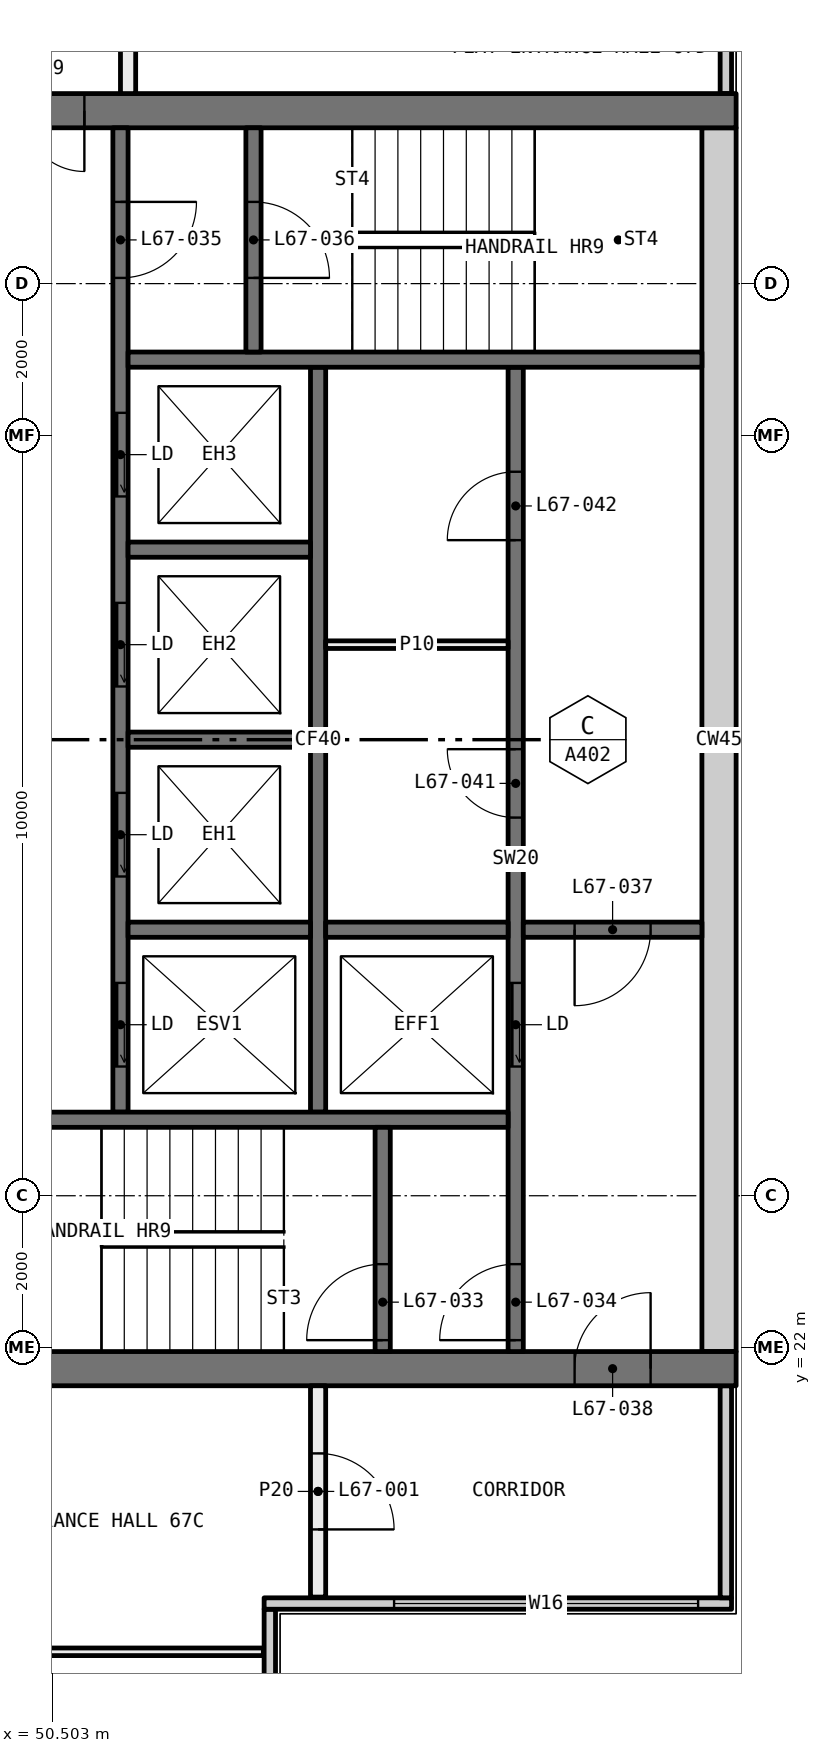
"""IFC4 building model, lengths in metres.
Left out: names, types, materials, properties, quantities, classifications, styles, units other than length and angle.
Written with IfcOpenShell. Run it as: python <this file> out.ifc"""

import sys

from ifc_helpers import new_model, si_unit, direction, frame, frame_2d, origin, place, context, subcontext, project, spatial, rectangle, extrude, element, fill, save


model = new_model("IFC4")
c1 = context("Model", 3, precision=1e-05, world=origin(), true_north=direction((0.0, 1.0)))
c2 = subcontext(c1, "Body", "Model", "MODEL_VIEW")
j1 = project(units=[si_unit("LENGTHUNIT", "METRE"), si_unit("PLANEANGLEUNIT", "RADIAN")], contexts=[c1])
p1 = place(None, origin())
s1 = spatial("IfcSite", under=j1, at=p1, CompositionType="ELEMENT")
p2 = place(p1, origin())
s2 = spatial("IfcBuilding", under=s1, at=p2, CompositionType="ELEMENT")
p3 = place(p2, frame((0.0, 0.0, 249.0)))
s3 = spatial("IfcBuildingStorey", under=s2, at=p3, CompositionType="ELEMENT", Elevation=249.0)
p4 = place(p3, frame((53.365, 12.71, 0.0), z_axis=(0.0, 0.0, 1.0), x_axis=(0.0, 1.0, 0.0)))
e1 = element("IfcWall", 1, at=p4, inside=s3, PredefinedType="ELEMENTEDWALL", context=c2, shape_type="SweptSolid", body=[
    extrude(rectangle(XDim=5.85, YDim=0.15, at=frame_2d((2.925, 0.0))), origin(), (0.0, 0.0, 1.0), 3.05),
])
p5 = place(p4, frame((0.29, 0.0, 0.45)))
e2 = element("IfcOpeningElement", 2, at=p5, cuts=e1, PredefinedType="OPENING", context=c2, shape_type="SweptSolid", body=[
    extrude(rectangle(XDim=4.0, YDim=2.55, at=frame_2d((2.0, 1.275))), frame((0.0, 0.085, 0.0), z_axis=(0.0, -1.0, 0.0), x_axis=(1.0, 0.0, 0.0)), (0.0, 0.0, 1.0), 0.17),
])
p6 = place(p3, frame((53.29, 18.635, 0.0), z_axis=(0.0, 0.0, 1.0), x_axis=(1.0, 0.0, 0.0)))
e3 = element("IfcWall", 3, at=p6, inside=s3, PredefinedType="ELEMENTEDWALL", context=c2, shape_type="SweptSolid", body=[
    extrude(rectangle(XDim=6.15, YDim=0.15, at=frame_2d((3.075, 0.0))), origin(), (0.0, 0.0, 1.0), 3.05),
])
p7 = place(p6, frame((1.71, 0.0, 0.45)))
e4 = element("IfcOpeningElement", 4, at=p7, cuts=e3, PredefinedType="OPENING", context=c2, shape_type="SweptSolid", body=[
    extrude(rectangle(XDim=4.0, YDim=2.55, at=frame_2d((2.0, 1.275))), frame((0.0, 0.085, 0.0), z_axis=(0.0, -1.0, 0.0), x_axis=(1.0, 0.0, 0.0)), (0.0, 0.0, 1.0), 0.17),
])
for number, where, z_axis, x_axis in (
    (5, (59.365, 18.71, 0.0), (0.0, 0.0, 1.0), (0.0, 1.0, 0.0)),
    (6, (59.365, 38.5, 0.0), (0.0, 0.0, 1.0), (0.0, 1.0, 0.0)),
):
    element("IfcWall", number, at=place(p3, frame(where, z_axis=z_axis, x_axis=x_axis)), inside=s3, PredefinedType="ELEMENTEDWALL", context=c2, shape_type="SweptSolid", body=[
        extrude(rectangle(XDim=2.79, YDim=0.15, at=frame_2d((1.395, 0.0))), origin(), (0.0, 0.0, 1.0), 3.05),
    ])
p8 = place(p3, frame((53.28, 18.0, 0.0), z_axis=(0.0, 0.0, 1.0), x_axis=(-1.0, 0.0, 0.0)))
e7 = element("IfcWall", 7, at=p8, inside=s3, PredefinedType="PARTITIONING", context=c2, shape_type="SweptSolid", body=[
    extrude(rectangle(XDim=4.78, YDim=0.1, at=frame_2d((2.39, 0.0))), origin(), (0.0, 0.0, 1.0), 3.05),
])
p9 = place(p3, frame((54.0, 18.72, 0.0), z_axis=(0.0, 0.0, 1.0), x_axis=(0.0, 1.0, 0.0)))
e8 = element("IfcWall", 8, at=p9, inside=s3, PredefinedType="PARTITIONING", context=c2, shape_type="SweptSolid", body=[
    extrude(rectangle(XDim=2.78, YDim=0.2, at=frame_2d((1.39, 0.0))), origin(), (0.0, 0.0, 1.0), 3.05),
])
p10 = place(p9, frame((0.89, 0.0, 0.0)))
e9 = element("IfcOpeningElement", 9, at=p10, cuts=e8, PredefinedType="OPENING", context=c2, shape_type="SweptSolid", body=[
    extrude(rectangle(XDim=1.0, YDim=2.1, at=frame_2d((0.5, 1.05))), frame((0.0, 0.11, 0.0), z_axis=(0.0, -1.0, 0.0), x_axis=(1.0, 0.0, 0.0)), (0.0, 0.0, 1.0), 0.22),
])
p11 = place(p3, frame((51.5, 41.9, 0.0), z_axis=(0.0, 0.0, 1.0), x_axis=(0.0, -1.0, 0.0)))
e10 = element("IfcWall", 10, at=p11, inside=s3, PredefinedType="PARTITIONING", context=c2, shape_type="SweptSolid", body=[
    extrude(rectangle(XDim=3.4, YDim=0.2, at=frame_2d((1.7, 0.0))), origin(), (0.0, 0.0, 1.0), 3.05),
])
p12 = place(p11, frame((1.2, 0.0, 0.0)))
e11 = element("IfcOpeningElement", 11, at=p12, cuts=e10, PredefinedType="OPENING", context=c2, shape_type="SweptSolid", body=[
    extrude(rectangle(XDim=1.0, YDim=2.1, at=frame_2d((0.5, 1.05))), frame((0.0, 0.11, 0.0), z_axis=(0.0, -1.0, 0.0), x_axis=(1.0, 0.0, 0.0)), (0.0, 0.0, 1.0), 0.22),
])
p13 = place(p3, frame((59.5, 21.725, 0.0), z_axis=(0.0, 0.0, 1.0), x_axis=(-1.0, 0.0, 0.0)))
e12 = element("IfcWall", 12, at=p13, inside=s3, PredefinedType="SHEAR", context=c2, shape_type="SweptSolid", body=[
    extrude(rectangle(XDim=11.0, YDim=0.45, at=frame_2d((5.5, 0.0))), origin(), (0.0, 0.0, 1.0), 3.05),
])
p14 = place(p13, frame((1.125, 0.0, 0.0)))
e13 = element("IfcOpeningElement", 13, at=p14, cuts=e12, PredefinedType="OPENING", context=c2, shape_type="SweptSolid", body=[
    extrude(rectangle(XDim=1.0, YDim=2.1, at=frame_2d((0.5, 1.05))), frame((0.0, 0.235, 0.0), z_axis=(0.0, -1.0, 0.0), x_axis=(1.0, 0.0, 0.0)), (0.0, 0.0, 1.0), 0.47),
])
p15 = place(p3, frame((59.5, 38.275, 0.0), z_axis=(0.0, 0.0, 1.0), x_axis=(-1.0, 0.0, 0.0)))
e14 = element("IfcWall", 14, at=p15, inside=s3, PredefinedType="SHEAR", context=c2, shape_type="SweptSolid", body=[
    extrude(rectangle(XDim=11.0, YDim=0.45, at=frame_2d((5.5, 0.0))), origin(), (0.0, 0.0, 1.0), 3.05),
])
p16 = place(p15, frame((8.575, 0.0, 0.0)))
e15 = element("IfcOpeningElement", 15, at=p16, cuts=e14, PredefinedType="OPENING", context=c2, shape_type="SweptSolid", body=[
    extrude(rectangle(XDim=1.6, YDim=2.1, at=frame_2d((0.8, 1.05))), frame((0.0, 0.235, 0.0), z_axis=(0.0, -1.0, 0.0), x_axis=(1.0, 0.0, 0.0)), (0.0, 0.0, 1.0), 0.47),
])
p17 = place(p3, frame((59.275, 21.95, 0.0), z_axis=(0.0, 0.0, 1.0), x_axis=(0.0, 1.0, 0.0)))
e16 = element("IfcWall", 16, at=p17, inside=s3, PredefinedType="SHEAR", context=c2, shape_type="SweptSolid", body=[
    extrude(rectangle(XDim=16.1, YDim=0.45, at=frame_2d((8.05, 0.0))), origin(), (0.0, 0.0, 1.0), 3.05),
])
p18 = place(p3, frame((56.6, 21.95, 0.0), z_axis=(0.0, 0.0, 1.0), x_axis=(0.0, 1.0, 0.0)))
e17 = element("IfcWall", 17, at=p18, inside=s3, PredefinedType="SOLIDWALL", context=c2, shape_type="SweptSolid", body=[
    extrude(rectangle(XDim=12.95, YDim=0.2, at=frame_2d((6.475, 0.0))), origin(), (0.0, 0.0, 1.0), 3.05),
])
p19 = place(p18, frame((3.75, 0.0, 0.0)))
e18 = element("IfcOpeningElement", 18, at=p19, cuts=e17, PredefinedType="OPENING", context=c2, shape_type="SweptSolid", body=[
    extrude(rectangle(XDim=1.1, YDim=2.1, at=frame_2d((0.55, 1.05))), frame((0.0, 0.11, 0.0), z_axis=(0.0, -1.0, 0.0), x_axis=(1.0, 0.0, 0.0)), (0.0, 0.0, 1.0), 0.22),
])
p20 = place(p18, frame((0.15, 0.0, 0.0)))
e19 = element("IfcOpeningElement", 19, at=p20, cuts=e17, PredefinedType="OPENING", context=c2, shape_type="SweptSolid", body=[
    extrude(rectangle(XDim=1.0, YDim=2.1, at=frame_2d((0.5, 1.05))), frame((0.0, 0.11, 0.0), z_axis=(0.0, -1.0, 0.0), x_axis=(1.0, 0.0, 0.0)), (0.0, 0.0, 1.0), 0.22),
])
p21 = place(p18, frame((7.025, 0.0, 0.0)))
e20 = element("IfcOpeningElement", 20, at=p21, cuts=e17, PredefinedType="OPENING", context=c2, shape_type="SweptSolid", body=[
    extrude(rectangle(XDim=0.9, YDim=2.1, at=frame_2d((0.45, 1.05))), frame((0.0, 0.11, 0.0), z_axis=(0.0, -1.0, 0.0), x_axis=(1.0, 0.0, 0.0)), (0.0, 0.0, 1.0), 0.22),
])
p22 = place(p18, frame((10.675, 0.0, 0.0)))
e21 = element("IfcOpeningElement", 21, at=p22, cuts=e17, PredefinedType="OPENING", context=c2, shape_type="SweptSolid", body=[
    extrude(rectangle(XDim=0.9, YDim=2.1, at=frame_2d((0.45, 1.05))), frame((0.0, 0.11, 0.0), z_axis=(0.0, -1.0, 0.0), x_axis=(1.0, 0.0, 0.0)), (0.0, 0.0, 1.0), 0.22),
])
p23 = place(p3, frame((51.4, 25.1, 0.0), z_axis=(0.0, 0.0, 1.0), x_axis=(0.0, 1.0, 0.0)))
e22 = element("IfcWall", 22, at=p23, inside=s3, PredefinedType="SOLIDWALL", context=c2, shape_type="SweptSolid", body=[
    extrude(rectangle(XDim=12.95, YDim=0.2, at=frame_2d((6.475, 0.0))), origin(), (0.0, 0.0, 1.0), 3.05),
])
p24 = place(p23, frame((0.6, 0.0, 0.0)))
e23 = element("IfcOpeningElement", 23, at=p24, cuts=e22, PredefinedType="OPENING", context=c2, shape_type="SweptSolid", body=[
    extrude(rectangle(XDim=1.1, YDim=2.1, at=frame_2d((0.55, 1.05))), frame((0.0, 0.11, 0.0), z_axis=(0.0, -1.0, 0.0), x_axis=(1.0, 0.0, 0.0)), (0.0, 0.0, 1.0), 0.22),
])
p25 = place(p23, frame((3.1, 0.0, 0.0)))
e24 = element("IfcOpeningElement", 24, at=p25, cuts=e22, PredefinedType="OPENING", context=c2, shape_type="SweptSolid", body=[
    extrude(rectangle(XDim=1.1, YDim=2.1, at=frame_2d((0.55, 1.05))), frame((0.0, 0.11, 0.0), z_axis=(0.0, -1.0, 0.0), x_axis=(1.0, 0.0, 0.0)), (0.0, 0.0, 1.0), 0.22),
])
p26 = place(p23, frame((5.6, 0.0, 0.0)))
e25 = element("IfcOpeningElement", 25, at=p26, cuts=e22, PredefinedType="OPENING", context=c2, shape_type="SweptSolid", body=[
    extrude(rectangle(XDim=1.1, YDim=2.1, at=frame_2d((0.55, 1.05))), frame((0.0, 0.11, 0.0), z_axis=(0.0, -1.0, 0.0), x_axis=(1.0, 0.0, 0.0)), (0.0, 0.0, 1.0), 0.22),
])
p27 = place(p23, frame((8.1, 0.0, 0.0)))
e26 = element("IfcOpeningElement", 26, at=p27, cuts=e22, PredefinedType="OPENING", context=c2, shape_type="SweptSolid", body=[
    extrude(rectangle(XDim=1.1, YDim=2.1, at=frame_2d((0.55, 1.05))), frame((0.0, 0.11, 0.0), z_axis=(0.0, -1.0, 0.0), x_axis=(1.0, 0.0, 0.0)), (0.0, 0.0, 1.0), 0.22),
])
p28 = place(p23, frame((10.975, 0.0, 0.0)))
e27 = element("IfcOpeningElement", 27, at=p28, cuts=e22, PredefinedType="OPENING", context=c2, shape_type="SweptSolid", body=[
    extrude(rectangle(XDim=1.0, YDim=2.1, at=frame_2d((0.5, 1.05))), frame((0.0, 0.11, 0.0), z_axis=(0.0, -1.0, 0.0), x_axis=(1.0, 0.0, 0.0)), (0.0, 0.0, 1.0), 0.22),
])
p29 = place(p3, frame((54.0, 25.1, 0.0), z_axis=(0.0, 0.0, 1.0), x_axis=(0.0, 1.0, 0.0)))
e28 = element("IfcWall", 28, at=p29, inside=s3, PredefinedType="SOLIDWALL", context=c2, shape_type="SweptSolid", body=[
    extrude(rectangle(XDim=9.8, YDim=0.2, at=frame_2d((4.9, 0.0))), origin(), (0.0, 0.0, 1.0), 3.05),
])
for number, where, z_axis, x_axis in (
    (29, (56.5, 25.0, 0.0), (0.0, 0.0, 1.0), (-1.0, 0.0, 0.0)),
    (30, (59.05, 35.0, 0.0), (0.0, 0.0, 1.0), (-1.0, 0.0, 0.0)),
):
    element("IfcWall", number, at=place(p3, frame(where, z_axis=z_axis, x_axis=x_axis)), inside=s3, PredefinedType="SOLIDWALL", context=c2, shape_type="SweptSolid", body=[
        extrude(rectangle(XDim=7.55, YDim=0.2, at=frame_2d((3.775, 0.0))), origin(), (0.0, 0.0, 1.0), 3.05),
    ])
p30 = place(p3, frame((59.05, 27.5, 0.0), z_axis=(0.0, 0.0, 1.0), x_axis=(-1.0, 0.0, 0.0)))
e31 = element("IfcWall", 31, at=p30, inside=s3, PredefinedType="SOLIDWALL", context=c2, shape_type="SweptSolid", body=[
    extrude(rectangle(XDim=2.35, YDim=0.2, at=frame_2d((1.175, 0.0))), origin(), (0.0, 0.0, 1.0), 3.05),
])
p31 = place(p30, frame((0.675, 0.0, 0.0)))
e32 = element("IfcOpeningElement", 32, at=p31, cuts=e31, PredefinedType="OPENING", context=c2, shape_type="SweptSolid", body=[
    extrude(rectangle(XDim=1.0, YDim=2.1, at=frame_2d((0.5, 1.05))), frame((0.0, 0.11, 0.0), z_axis=(0.0, -1.0, 0.0), x_axis=(1.0, 0.0, 0.0)), (0.0, 0.0, 1.0), 0.22),
])
p32 = place(p3, frame((54.85, 21.95, 0.0), z_axis=(0.0, 0.0, 1.0), x_axis=(0.0, 1.0, 0.0)))
e33 = element("IfcWall", 33, at=p32, inside=s3, PredefinedType="SOLIDWALL", context=c2, shape_type="SweptSolid", body=[
    extrude(rectangle(XDim=2.95, YDim=0.2, at=frame_2d((1.475, 0.0))), origin(), (0.0, 0.0, 1.0), 3.05),
])
p33 = place(p32, frame((0.15, 0.0, 0.0)))
e34 = element("IfcOpeningElement", 34, at=p33, cuts=e33, PredefinedType="OPENING", context=c2, shape_type="SweptSolid", body=[
    extrude(rectangle(XDim=1.0, YDim=2.1, at=frame_2d((0.5, 1.05))), frame((0.0, 0.11, 0.0), z_axis=(0.0, -1.0, 0.0), x_axis=(1.0, 0.0, 0.0)), (0.0, 0.0, 1.0), 0.22),
])
p34 = place(p3, frame((53.15, 35.1, 0.0), z_axis=(0.0, 0.0, 1.0), x_axis=(0.0, 1.0, 0.0)))
e35 = element("IfcWall", 35, at=p34, inside=s3, PredefinedType="SOLIDWALL", context=c2, shape_type="SweptSolid", body=[
    extrude(rectangle(XDim=2.95, YDim=0.2, at=frame_2d((1.475, 0.0))), origin(), (0.0, 0.0, 1.0), 3.05),
])
p35 = place(p34, frame((0.975, 0.0, 0.0)))
e36 = element("IfcOpeningElement", 36, at=p35, cuts=e35, PredefinedType="OPENING", context=c2, shape_type="SweptSolid", body=[
    extrude(rectangle(XDim=1.0, YDim=2.1, at=frame_2d((0.5, 1.05))), frame((0.0, 0.11, 0.0), z_axis=(0.0, -1.0, 0.0), x_axis=(1.0, 0.0, 0.0)), (0.0, 0.0, 1.0), 0.22),
])
for number, where, z_axis, x_axis in (
    (37, (56.5, 27.5, 0.0), (0.0, 0.0, 1.0), (-1.0, 0.0, 0.0)),
    (38, (53.9, 27.5, 0.0), (0.0, 0.0, 1.0), (-1.0, 0.0, 0.0)),
    (39, (53.9, 30.0, 0.0), (0.0, 0.0, 1.0), (-1.0, 0.0, 0.0)),
    (40, (53.9, 32.5, 0.0), (0.0, 0.0, 1.0), (-1.0, 0.0, 0.0)),
):
    element("IfcWall", number, at=place(p3, frame(where, z_axis=z_axis, x_axis=x_axis)), inside=s3, PredefinedType="SOLIDWALL", context=c2, shape_type="SweptSolid", body=[
        extrude(rectangle(XDim=2.4, YDim=0.2, at=frame_2d((1.2, 0.0))), origin(), (0.0, 0.0, 1.0), 3.05),
    ])
p36 = place(p3, frame((56.5, 31.25, 0.0), z_axis=(0.0, 0.0, 1.0), x_axis=(-1.0, 0.0, 0.0)))
e41 = element("IfcWall", 41, at=p36, inside=s3, PredefinedType="PARTITIONING", context=c2, shape_type="SweptSolid", body=[
    extrude(rectangle(XDim=2.4, YDim=0.1, at=frame_2d((1.2, 0.0))), origin(), (0.0, 0.0, 1.0), 3.05),
])
p37 = place(p7, origin())
e42 = element("IfcWindow", 42, at=p37, inside=s3, PartitioningType="SINGLE_PANEL", PredefinedType="WINDOW", context=c2, shape_type="SweptSolid", body=[
    extrude(rectangle(XDim=4.0, YDim=2.55, at=frame_2d((2.0, 1.275))), frame((0.0, 0.03, 0.0), z_axis=(0.0, -1.0, 0.0), x_axis=(1.0, 0.0, 0.0)), (0.0, 0.0, 1.0), 0.06),
])
fill(e4, e42)
p38 = place(p10, frame((1.0, 0.0, 0.0), x_axis=(-1.0, 0.0, 0.0)))
e43 = element("IfcDoor", 43, at=p38, inside=s3, OperationType="SINGLE_SWING_LEFT", PredefinedType="DOOR", context=c2, shape_type="SweptSolid", body=[
    extrude(rectangle(XDim=1.0, YDim=2.1, at=frame_2d((0.5, 1.05))), frame((0.0, 0.025, 0.0), z_axis=(0.0, -1.0, 0.0), x_axis=(1.0, 0.0, 0.0)), (0.0, 0.0, 1.0), 0.05),
])
fill(e9, e43)
p39 = place(p24, origin())
e44 = element("IfcDoor", 44, at=p39, inside=s3, OperationType="SLIDING_TO_LEFT", PredefinedType="DOOR", context=c2, shape_type="SweptSolid", body=[
    extrude(rectangle(XDim=1.1, YDim=2.1, at=frame_2d((0.55, 1.05))), frame((0.0, 0.025, 0.0), z_axis=(0.0, -1.0, 0.0), x_axis=(1.0, 0.0, 0.0)), (0.0, 0.0, 1.0), 0.05),
])
fill(e23, e44)
p40 = place(p25, origin())
e45 = element("IfcDoor", 45, at=p40, inside=s3, OperationType="SLIDING_TO_LEFT", PredefinedType="DOOR", context=c2, shape_type="SweptSolid", body=[
    extrude(rectangle(XDim=1.1, YDim=2.1, at=frame_2d((0.55, 1.05))), frame((0.0, 0.025, 0.0), z_axis=(0.0, -1.0, 0.0), x_axis=(1.0, 0.0, 0.0)), (0.0, 0.0, 1.0), 0.05),
])
fill(e24, e45)
p41 = place(p26, origin())
e46 = element("IfcDoor", 46, at=p41, inside=s3, OperationType="SLIDING_TO_LEFT", PredefinedType="DOOR", context=c2, shape_type="SweptSolid", body=[
    extrude(rectangle(XDim=1.1, YDim=2.1, at=frame_2d((0.55, 1.05))), frame((0.0, 0.025, 0.0), z_axis=(0.0, -1.0, 0.0), x_axis=(1.0, 0.0, 0.0)), (0.0, 0.0, 1.0), 0.05),
])
fill(e25, e46)
p42 = place(p27, origin())
e47 = element("IfcDoor", 47, at=p42, inside=s3, OperationType="SLIDING_TO_LEFT", PredefinedType="DOOR", context=c2, shape_type="SweptSolid", body=[
    extrude(rectangle(XDim=1.1, YDim=2.1, at=frame_2d((0.55, 1.05))), frame((0.0, 0.025, 0.0), z_axis=(0.0, -1.0, 0.0), x_axis=(1.0, 0.0, 0.0)), (0.0, 0.0, 1.0), 0.05),
])
fill(e26, e47)
p43 = place(p19, origin())
e48 = element("IfcDoor", 48, at=p43, inside=s3, OperationType="SLIDING_TO_LEFT", PredefinedType="DOOR", context=c2, shape_type="SweptSolid", body=[
    extrude(rectangle(XDim=1.1, YDim=2.1, at=frame_2d((0.55, 1.05))), frame((0.0, 0.025, 0.0), z_axis=(0.0, -1.0, 0.0), x_axis=(1.0, 0.0, 0.0)), (0.0, 0.0, 1.0), 0.05),
])
fill(e18, e48)
p44 = place(p33, origin())
e49 = element("IfcDoor", 49, at=p44, inside=s3, OperationType="SINGLE_SWING_RIGHT", PredefinedType="DOOR", context=c2, shape_type="SweptSolid", body=[
    extrude(rectangle(XDim=1.0, YDim=2.1, at=frame_2d((0.5, 1.05))), frame((0.0, 0.025, 0.0), z_axis=(0.0, -1.0, 0.0), x_axis=(1.0, 0.0, 0.0)), (0.0, 0.0, 1.0), 0.05),
])
fill(e34, e49)
p45 = place(p20, origin())
e50 = element("IfcDoor", 50, at=p45, inside=s3, OperationType="SINGLE_SWING_RIGHT", PredefinedType="DOOR", context=c2, shape_type="SweptSolid", body=[
    extrude(rectangle(XDim=1.0, YDim=2.1, at=frame_2d((0.5, 1.05))), frame((0.0, 0.025, 0.0), z_axis=(0.0, -1.0, 0.0), x_axis=(1.0, 0.0, 0.0)), (0.0, 0.0, 1.0), 0.05),
])
fill(e19, e50)
p46 = place(p28, frame((1.0, 0.0, 0.0), x_axis=(-1.0, 0.0, 0.0)))
e51 = element("IfcDoor", 51, at=p46, inside=s3, OperationType="SINGLE_SWING_RIGHT", PredefinedType="DOOR", context=c2, shape_type="SweptSolid", body=[
    extrude(rectangle(XDim=1.0, YDim=2.1, at=frame_2d((0.5, 1.05))), frame((0.0, 0.025, 0.0), z_axis=(0.0, -1.0, 0.0), x_axis=(1.0, 0.0, 0.0)), (0.0, 0.0, 1.0), 0.05),
])
fill(e27, e51)
p47 = place(p35, frame((1.0, 0.0, 0.0), x_axis=(-1.0, 0.0, 0.0)))
e52 = element("IfcDoor", 52, at=p47, inside=s3, OperationType="SINGLE_SWING_LEFT", PredefinedType="DOOR", context=c2, shape_type="SweptSolid", body=[
    extrude(rectangle(XDim=1.0, YDim=2.1, at=frame_2d((0.5, 1.05))), frame((0.0, 0.025, 0.0), z_axis=(0.0, -1.0, 0.0), x_axis=(1.0, 0.0, 0.0)), (0.0, 0.0, 1.0), 0.05),
])
fill(e36, e52)
p48 = place(p31, origin())
e53 = element("IfcDoor", 53, at=p48, inside=s3, OperationType="SINGLE_SWING_LEFT", PredefinedType="DOOR", context=c2, shape_type="SweptSolid", body=[
    extrude(rectangle(XDim=1.0, YDim=2.1, at=frame_2d((0.5, 1.05))), frame((0.0, 0.025, 0.0), z_axis=(0.0, -1.0, 0.0), x_axis=(1.0, 0.0, 0.0)), (0.0, 0.0, 1.0), 0.05),
])
fill(e32, e53)
p49 = place(p14, frame((1.0, 0.0, 0.0), x_axis=(-1.0, 0.0, 0.0)))
e54 = element("IfcDoor", 54, at=p49, inside=s3, OperationType="SINGLE_SWING_LEFT", PredefinedType="DOOR", context=c2, shape_type="SweptSolid", body=[
    extrude(rectangle(XDim=1.0, YDim=2.1, at=frame_2d((0.5, 1.05))), frame((0.0, 0.025, 0.0), z_axis=(0.0, -1.0, 0.0), x_axis=(1.0, 0.0, 0.0)), (0.0, 0.0, 1.0), 0.05),
])
fill(e13, e54)
p50 = place(p16, origin())
e55 = element("IfcDoor", 55, at=p50, inside=s3, OperationType="DOUBLE_DOOR_SINGLE_SWING", PredefinedType="DOOR", context=c2, shape_type="SweptSolid", body=[
    extrude(rectangle(XDim=1.6, YDim=2.1, at=frame_2d((0.8, 1.05))), frame((0.0, 0.025, 0.0), z_axis=(0.0, -1.0, 0.0), x_axis=(1.0, 0.0, 0.0)), (0.0, 0.0, 1.0), 0.05),
])
fill(e15, e55)
p51 = place(p21, origin())
e56 = element("IfcDoor", 56, at=p51, inside=s3, OperationType="SINGLE_SWING_LEFT", PredefinedType="DOOR", context=c2, shape_type="SweptSolid", body=[
    extrude(rectangle(XDim=0.9, YDim=2.1, at=frame_2d((0.45, 1.05))), frame((0.0, 0.025, 0.0), z_axis=(0.0, -1.0, 0.0), x_axis=(1.0, 0.0, 0.0)), (0.0, 0.0, 1.0), 0.05),
])
fill(e20, e56)
p52 = place(p22, origin())
e57 = element("IfcDoor", 57, at=p52, inside=s3, OperationType="SINGLE_SWING_RIGHT", PredefinedType="DOOR", context=c2, shape_type="SweptSolid", body=[
    extrude(rectangle(XDim=0.9, YDim=2.1, at=frame_2d((0.45, 1.05))), frame((0.0, 0.025, 0.0), z_axis=(0.0, -1.0, 0.0), x_axis=(1.0, 0.0, 0.0)), (0.0, 0.0, 1.0), 0.05),
])
fill(e21, e57)
save(model, sys.argv[1])
